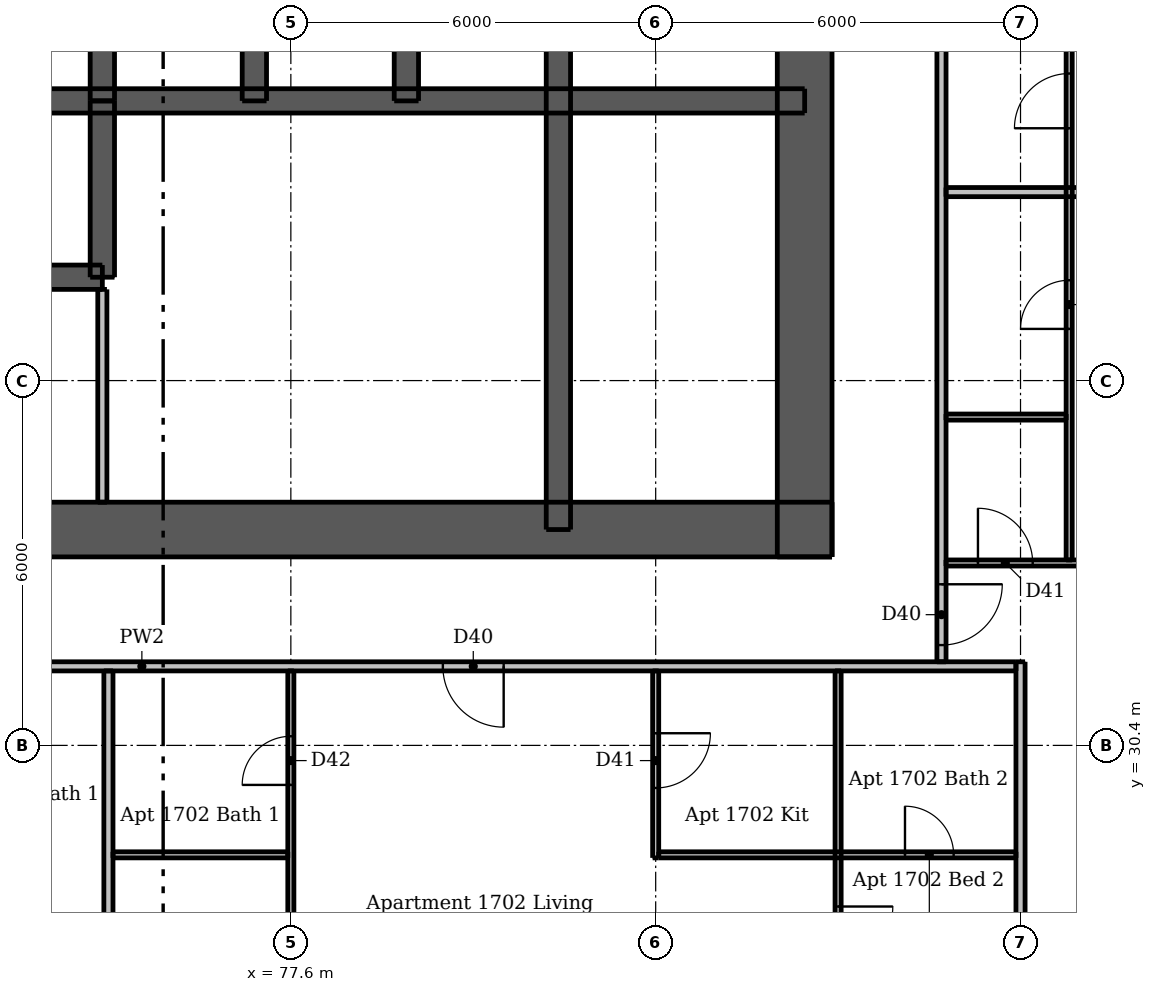
"""IFC4 building model, lengths in metres.
Left out: names, types, materials, properties, quantities, classifications, styles, units other than length and angle.
Written with IfcOpenShell. Run it as: python <this file> out.ifc"""

import sys

from ifc_helpers import new_model, si_unit, direction, frame, frame_2d, origin, place, context, subcontext, project, spatial, rectangle, extrude, element, fill, save


model = new_model("IFC4")
c1 = context("Model", 3, precision=1e-05, world=origin(), true_north=direction((0.0, 1.0)))
c2 = subcontext(c1, "Body", "Model", "MODEL_VIEW")
j1 = project(units=[si_unit("LENGTHUNIT", "METRE"), si_unit("PLANEANGLEUNIT", "RADIAN")], contexts=[c1])
p1 = place(None, origin())
s1 = spatial("IfcSite", under=j1, at=p1, CompositionType="ELEMENT")
p2 = place(p1, origin())
s2 = spatial("IfcBuilding", under=s1, at=p2, CompositionType="ELEMENT")
p3 = place(p2, frame((0.0, 0.0, 63.1)))
s3 = spatial("IfcBuildingStorey", under=s2, at=p3, CompositionType="ELEMENT", Elevation=63.1)
p4 = place(p3, frame((62.5, 33.95, 0.0), z_axis=(0.0, 0.0, 1.0), x_axis=(1.0, 0.0, 0.0)))
e1 = element("IfcWall", 1, at=p4, inside=s3, PredefinedType="SHEAR", context=c2, shape_type="SweptSolid", body=[
    extrude(rectangle(XDim=24.0, YDim=0.9, at=frame_2d((12.0, 0.0))), origin(), (0.0, 0.0, 1.0), 3.05),
])
p5 = place(p4, frame((2.05, 0.0, 0.0)))
e2 = element("IfcOpeningElement", 2, at=p5, cuts=e1, PredefinedType="OPENING", context=c2, shape_type="SweptSolid", body=[
    extrude(rectangle(XDim=1.1, YDim=2.1, at=frame_2d((0.55, 1.05))), frame((0.0, 0.46, 0.0), z_axis=(0.0, -1.0, 0.0), x_axis=(1.0, 0.0, 0.0)), (0.0, 0.0, 1.0), 0.92),
])
p6 = place(p4, frame((20.85, 0.0, 0.0)))
e3 = element("IfcOpeningElement", 3, at=p6, cuts=e1, PredefinedType="OPENING", context=c2, shape_type="SweptSolid", body=[
    extrude(rectangle(XDim=1.1, YDim=2.1, at=frame_2d((0.55, 1.05))), frame((0.0, 0.46, 0.0), z_axis=(0.0, -1.0, 0.0), x_axis=(1.0, 0.0, 0.0)), (0.0, 0.0, 1.0), 0.92),
])
p7 = place(p4, frame((8.0, 0.0, 0.0)))
e4 = element("IfcOpeningElement", 4, at=p7, cuts=e1, PredefinedType="OPENING", context=c2, shape_type="SweptSolid", body=[
    extrude(rectangle(XDim=1.1, YDim=2.1, at=frame_2d((0.55, 1.05))), frame((0.0, 0.46, 0.0), z_axis=(0.0, -1.0, 0.0), x_axis=(1.0, 0.0, 0.0)), (0.0, 0.0, 1.0), 0.92),
])
p8 = place(p4, frame((15.3, 0.0, 0.0)))
e5 = element("IfcOpeningElement", 5, at=p8, cuts=e1, PredefinedType="OPENING", context=c2, shape_type="SweptSolid", body=[
    extrude(rectangle(XDim=0.9, YDim=2.1, at=frame_2d((0.45, 1.05))), frame((0.0, 0.46, 0.0), z_axis=(0.0, -1.0, 0.0), x_axis=(1.0, 0.0, 0.0)), (0.0, 0.0, 1.0), 0.92),
])
p9 = place(p3, frame((86.05, 33.5, 0.0), z_axis=(0.0, 0.0, 1.0), x_axis=(0.0, 1.0, 0.0)))
e6 = element("IfcWall", 6, at=p9, inside=s3, PredefinedType="SHEAR", context=c2, shape_type="SweptSolid", body=[
    extrude(rectangle(XDim=24.0, YDim=0.9, at=frame_2d((12.0, 0.0))), origin(), (0.0, 0.0, 1.0), 3.05),
])
p10 = place(p9, frame((11.2, 0.0, 0.0)))
e7 = element("IfcOpeningElement", 7, at=p10, cuts=e6, PredefinedType="OPENING", context=c2, shape_type="SweptSolid", body=[
    extrude(rectangle(XDim=1.6, YDim=2.1, at=frame_2d((0.8, 1.05))), frame((0.0, 0.46, 0.0), z_axis=(0.0, -1.0, 0.0), x_axis=(1.0, 0.0, 0.0)), (0.0, 0.0, 1.0), 0.92),
])
p11 = place(p3, frame((62.95, 41.0, 0.0), z_axis=(0.0, 0.0, 1.0), x_axis=(1.0, 0.0, 0.0)))
e8 = element("IfcWall", 8, at=p11, inside=s3, PredefinedType="SHEAR", context=c2, shape_type="SweptSolid", body=[
    extrude(rectangle(XDim=23.1, YDim=0.4, at=frame_2d((11.55, 0.0))), origin(), (0.0, 0.0, 1.0), 3.05),
])
p12 = place(p3, frame((82.0, 33.95, 0.0), z_axis=(0.0, 0.0, 1.0), x_axis=(0.0, 1.0, 0.0)))
e9 = element("IfcWall", 9, at=p12, inside=s3, PredefinedType="SHEAR", context=c2, shape_type="SweptSolid", body=[
    extrude(rectangle(XDim=9.95, YDim=0.4, at=frame_2d((4.975, 0.0))), origin(), (0.0, 0.0, 1.0), 3.05),
])
for number, where, z_axis, x_axis in (
    (10, (74.5, 41.0, 0.0), (0.0, 0.0, 1.0), (0.0, 1.0, 0.0)),
    (11, (77.0, 41.0, 0.0), (0.0, 0.0, 1.0), (0.0, 1.0, 0.0)),
    (12, (79.5, 41.0, 0.0), (0.0, 0.0, 1.0), (0.0, 1.0, 0.0)),
):
    element("IfcWall", number, at=place(p3, frame(where, z_axis=z_axis, x_axis=x_axis)), inside=s3, PredefinedType="SHEAR", context=c2, shape_type="SweptSolid", body=[
        extrude(rectangle(XDim=2.9, YDim=0.4, at=frame_2d((1.45, 0.0))), origin(), (0.0, 0.0, 1.0), 3.05),
    ])
p13 = place(p3, frame((67.0, 38.1, 0.0), z_axis=(0.0, 0.0, 1.0), x_axis=(1.0, 0.0, 0.0)))
e13 = element("IfcWall", 13, at=p13, inside=s3, PredefinedType="SHEAR", context=c2, shape_type="SweptSolid", body=[
    extrude(rectangle(XDim=7.5, YDim=0.4, at=frame_2d((3.75, 0.0))), origin(), (0.0, 0.0, 1.0), 3.05),
])
p14 = place(p13, frame((0.7, 0.0, 0.0)))
e14 = element("IfcOpeningElement", 14, at=p14, cuts=e13, PredefinedType="OPENING", context=c2, shape_type="SweptSolid", body=[
    extrude(rectangle(XDim=1.1, YDim=2.1, at=frame_2d((0.55, 1.05))), frame((0.0, 0.21, 0.0), z_axis=(0.0, -1.0, 0.0), x_axis=(1.0, 0.0, 0.0)), (0.0, 0.0, 1.0), 0.42),
])
p15 = place(p13, frame((3.2, 0.0, 0.0)))
e15 = element("IfcOpeningElement", 15, at=p15, cuts=e13, PredefinedType="OPENING", context=c2, shape_type="SweptSolid", body=[
    extrude(rectangle(XDim=1.1, YDim=2.1, at=frame_2d((0.55, 1.05))), frame((0.0, 0.21, 0.0), z_axis=(0.0, -1.0, 0.0), x_axis=(1.0, 0.0, 0.0)), (0.0, 0.0, 1.0), 0.42),
])
p16 = place(p13, frame((5.65, 0.0, 0.0)))
e16 = element("IfcOpeningElement", 16, at=p16, cuts=e13, PredefinedType="OPENING", context=c2, shape_type="SweptSolid", body=[
    extrude(rectangle(XDim=1.2, YDim=2.1, at=frame_2d((0.6, 1.05))), frame((0.0, 0.21, 0.0), z_axis=(0.0, -1.0, 0.0), x_axis=(1.0, 0.0, 0.0)), (0.0, 0.0, 1.0), 0.42),
])
p17 = place(p3, frame((74.5, 38.1, 0.0), z_axis=(0.0, 0.0, 1.0), x_axis=(0.0, 1.0, 0.0)))
e17 = element("IfcWall", 17, at=p17, inside=s3, PredefinedType="SHEAR", context=c2, shape_type="SweptSolid", body=[
    extrude(rectangle(XDim=2.9, YDim=0.4, at=frame_2d((1.45, 0.0))), origin(), (0.0, 0.0, 1.0), 3.05),
])
p18 = place(p3, frame((74.5, 34.4, 0.0), z_axis=(0.0, 0.0, 1.0), x_axis=(0.0, 1.0, 0.0)))
e18 = element("IfcWall", 18, at=p18, inside=s3, PredefinedType="PLUMBINGWALL", context=c2, shape_type="SweptSolid", body=[
    extrude(rectangle(XDim=3.5, YDim=0.15, at=frame_2d((1.75, 0.0))), origin(), (0.0, 0.0, 1.0), 3.05),
])
p19 = place(p3, frame((77.6, 24.5, 0.0), z_axis=(0.0, 0.0, 1.0), x_axis=(0.0, 1.0, 0.0)))
e19 = element("IfcWall", 19, at=p19, inside=s3, PredefinedType="PARTITIONING", context=c2, shape_type="SweptSolid", body=[
    extrude(rectangle(XDim=7.125, YDim=0.1, at=frame_2d((3.562, 0.0))), origin(), (0.0, 0.0, 1.0), 2.59),
])
p20 = place(p19, frame((0.85, 0.0, 0.0)))
e20 = element("IfcOpeningElement", 20, at=p20, cuts=e19, PredefinedType="OPENING", context=c2, shape_type="SweptSolid", body=[
    extrude(rectangle(XDim=0.9, YDim=2.1, at=frame_2d((0.45, 1.05))), frame((0.0, 0.06, 0.0), z_axis=(0.0, -1.0, 0.0), x_axis=(1.0, 0.0, 0.0)), (0.0, 0.0, 1.0), 0.12),
])
p21 = place(p19, frame((5.25, 0.0, 0.0)))
e21 = element("IfcOpeningElement", 21, at=p21, cuts=e19, PredefinedType="OPENING", context=c2, shape_type="SweptSolid", body=[
    extrude(rectangle(XDim=0.8, YDim=2.1, at=frame_2d((0.4, 1.05))), frame((0.0, 0.06, 0.0), z_axis=(0.0, -1.0, 0.0), x_axis=(1.0, 0.0, 0.0)), (0.0, 0.0, 1.0), 0.12),
])
p22 = place(p3, frame((83.6, 31.625, 0.0), z_axis=(0.0, 0.0, 1.0), x_axis=(0.0, -1.0, 0.0)))
e22 = element("IfcWall", 22, at=p22, inside=s3, PredefinedType="PARTITIONING", context=c2, shape_type="SweptSolid", body=[
    extrude(rectangle(XDim=3.075, YDim=0.1, at=frame_2d((1.538, 0.0))), origin(), (0.0, 0.0, 1.0), 2.647),
])
p23 = place(p22, frame((1.025, 0.0, 0.0)))
e23 = element("IfcOpeningElement", 23, at=p23, cuts=e22, PredefinedType="OPENING", context=c2, shape_type="SweptSolid", body=[
    extrude(rectangle(XDim=0.9, YDim=2.1, at=frame_2d((0.45, 1.05))), frame((0.0, 0.06, 0.0), z_axis=(0.0, -1.0, 0.0), x_axis=(1.0, 0.0, 0.0)), (0.0, 0.0, 1.0), 0.12),
])
p24 = place(p3, frame((86.6, 31.625, 0.0), z_axis=(0.0, 0.0, 1.0), x_axis=(0.0, -1.0, 0.0)))
e24 = element("IfcWall", 24, at=p24, inside=s3, PredefinedType="PARTITIONING", context=c2, shape_type="SweptSolid", body=[
    extrude(rectangle(XDim=5.625, YDim=0.1, at=frame_2d((2.812, 0.0))), origin(), (0.0, 0.0, 1.0), 3.05),
])
p25 = place(p24, frame((3.875, 0.0, 0.0)))
e25 = element("IfcOpeningElement", 25, at=p25, cuts=e24, PredefinedType="OPENING", context=c2, shape_type="SweptSolid", body=[
    extrude(rectangle(XDim=0.9, YDim=2.1, at=frame_2d((0.45, 1.05))), frame((0.0, 0.06, 0.0), z_axis=(0.0, -1.0, 0.0), x_axis=(1.0, 0.0, 0.0)), (0.0, 0.0, 1.0), 0.12),
])
p26 = place(p3, frame((90.4, 33.45, 0.0), z_axis=(0.0, 0.0, 1.0), x_axis=(0.0, 1.0, 0.0)))
e26 = element("IfcWall", 26, at=p26, inside=s3, PredefinedType="PARTITIONING", context=c2, shape_type="SweptSolid", body=[
    extrude(rectangle(XDim=9.1, YDim=0.1, at=frame_2d((4.55, 0.0))), origin(), (0.0, 0.0, 1.0), 3.05),
])
p27 = place(p26, frame((3.8, 0.0, 0.0)))
e27 = element("IfcOpeningElement", 27, at=p27, cuts=e26, PredefinedType="OPENING", context=c2, shape_type="SweptSolid", body=[
    extrude(rectangle(XDim=0.8, YDim=2.1, at=frame_2d((0.4, 1.05))), frame((0.0, 0.06, 0.0), z_axis=(0.0, -1.0, 0.0), x_axis=(1.0, 0.0, 0.0)), (0.0, 0.0, 1.0), 0.12),
])
p28 = place(p26, frame((7.1, 0.0, 0.0)))
e28 = element("IfcOpeningElement", 28, at=p28, cuts=e26, PredefinedType="OPENING", context=c2, shape_type="SweptSolid", body=[
    extrude(rectangle(XDim=0.9, YDim=2.1, at=frame_2d((0.45, 1.05))), frame((0.0, 0.06, 0.0), z_axis=(0.0, -1.0, 0.0), x_axis=(1.0, 0.0, 0.0)), (0.0, 0.0, 1.0), 0.12),
])
p29 = place(p3, frame((88.375, 35.8, 0.0), z_axis=(0.0, 0.0, 1.0), x_axis=(1.0, 0.0, 0.0)))
e29 = element("IfcWall", 29, at=p29, inside=s3, PredefinedType="PARTITIONING", context=c2, shape_type="SweptSolid", body=[
    extrude(rectangle(XDim=1.975, YDim=0.1, at=frame_2d((0.988, 0.0))), origin(), (0.0, 0.0, 1.0), 3.05),
])
p30 = place(p3, frame((88.375, 33.4, 0.0), z_axis=(0.0, 0.0, 1.0), x_axis=(1.0, 0.0, 0.0)))
e30 = element("IfcWall", 30, at=p30, inside=s3, PredefinedType="PARTITIONING", context=c2, shape_type="SweptSolid", body=[
    extrude(rectangle(XDim=5.625, YDim=0.1, at=frame_2d((2.812, 0.0))), origin(), (0.0, 0.0, 1.0), 3.05),
])
p31 = place(p30, frame((0.525, 0.0, 0.0)))
e31 = element("IfcOpeningElement", 31, at=p31, cuts=e30, PredefinedType="OPENING", context=c2, shape_type="SweptSolid", body=[
    extrude(rectangle(XDim=0.9, YDim=2.1, at=frame_2d((0.45, 1.05))), frame((0.0, 0.06, 0.0), z_axis=(0.0, -1.0, 0.0), x_axis=(1.0, 0.0, 0.0)), (0.0, 0.0, 1.0), 0.12),
])
p32 = place(p30, frame((3.375, 0.0, 0.0)))
e32 = element("IfcOpeningElement", 32, at=p32, cuts=e30, PredefinedType="OPENING", context=c2, shape_type="SweptSolid", body=[
    extrude(rectangle(XDim=0.9, YDim=2.1, at=frame_2d((0.45, 1.05))), frame((0.0, 0.06, 0.0), z_axis=(0.0, -1.0, 0.0), x_axis=(1.0, 0.0, 0.0)), (0.0, 0.0, 1.0), 0.12),
])
p33 = place(p3, frame((74.675, 28.6, 0.0), z_axis=(0.0, 0.0, 1.0), x_axis=(1.0, 0.0, 0.0)))
e33 = element("IfcWall", 33, at=p33, inside=s3, PredefinedType="PARTITIONING", context=c2, shape_type="SweptSolid", body=[
    extrude(rectangle(XDim=2.875, YDim=0.1, at=frame_2d((1.438, 0.0))), origin(), (0.0, 0.0, 1.0), 3.05),
])
p34 = place(p3, frame((83.65, 28.6, 0.0), z_axis=(0.0, 0.0, 1.0), x_axis=(1.0, 0.0, 0.0)))
e34 = element("IfcWall", 34, at=p34, inside=s3, PredefinedType="PARTITIONING", context=c2, shape_type="SweptSolid", body=[
    extrude(rectangle(XDim=5.875, YDim=0.1, at=frame_2d((2.938, 0.0))), origin(), (0.0, 0.0, 1.0), 3.05),
])
p35 = place(p34, frame((4.05, 0.0, 0.0)))
e35 = element("IfcOpeningElement", 35, at=p35, cuts=e34, PredefinedType="OPENING", context=c2, shape_type="SweptSolid", body=[
    extrude(rectangle(XDim=0.8, YDim=2.1, at=frame_2d((0.4, 1.05))), frame((0.0, 0.06, 0.0), z_axis=(0.0, -1.0, 0.0), x_axis=(1.0, 0.0, 0.0)), (0.0, 0.0, 1.0), 0.12),
])
p36 = place(p3, frame((74.6, 21.5, 0.0), z_axis=(0.0, 0.0, 1.0), x_axis=(0.0, 1.0, 0.0)))
e36 = element("IfcWall", 36, at=p36, inside=s3, PredefinedType="PARTITIONING", context=c2, shape_type="SweptSolid", body=[
    extrude(rectangle(XDim=10.125, YDim=0.15, at=frame_2d((5.062, 0.0))), origin(), (0.0, 0.0, 1.0), 3.05),
])
p37 = place(p3, frame((88.3, 60.475, 0.0), z_axis=(0.0, 0.0, 1.0), x_axis=(0.0, -1.0, 0.0)))
e37 = element("IfcWall", 37, at=p37, inside=s3, PredefinedType="PARTITIONING", context=c2, shape_type="SweptSolid", body=[
    extrude(rectangle(XDim=28.7, YDim=0.15, at=frame_2d((14.35, 0.0))), origin(), (0.0, 0.0, 1.0), 3.05),
])
p38 = place(p37, frame((27.425, 0.0, 0.0)))
e38 = element("IfcOpeningElement", 38, at=p38, cuts=e37, PredefinedType="OPENING", context=c2, shape_type="SweptSolid", body=[
    extrude(rectangle(XDim=1.0, YDim=2.1, at=frame_2d((0.5, 1.05))), frame((0.0, 0.085, 0.0), z_axis=(0.0, -1.0, 0.0), x_axis=(1.0, 0.0, 0.0)), (0.0, 0.0, 1.0), 0.17),
])
p39 = place(p37, frame((14.525, 0.0, 0.0)))
e39 = element("IfcOpeningElement", 39, at=p39, cuts=e37, PredefinedType="OPENING", context=c2, shape_type="SweptSolid", body=[
    extrude(rectangle(XDim=1.0, YDim=2.1, at=frame_2d((0.5, 1.05))), frame((0.0, 0.085, 0.0), z_axis=(0.0, -1.0, 0.0), x_axis=(1.0, 0.0, 0.0)), (0.0, 0.0, 1.0), 0.17),
])
p40 = place(p37, frame((3.775, 0.0, 0.0)))
e40 = element("IfcOpeningElement", 40, at=p40, cuts=e37, PredefinedType="OPENING", context=c2, shape_type="SweptSolid", body=[
    extrude(rectangle(XDim=1.0, YDim=2.1, at=frame_2d((0.5, 1.05))), frame((0.0, 0.085, 0.0), z_axis=(0.0, -1.0, 0.0), x_axis=(1.0, 0.0, 0.0)), (0.0, 0.0, 1.0), 0.17),
])
p41 = place(p3, frame((89.6, 26.0, 0.0), z_axis=(0.0, 0.0, 1.0), x_axis=(0.0, 1.0, 0.0)))
e41 = element("IfcWall", 41, at=p41, inside=s3, PredefinedType="PARTITIONING", context=c2, shape_type="SweptSolid", body=[
    extrude(rectangle(XDim=5.775, YDim=0.15, at=frame_2d((2.887, 0.0))), origin(), (0.0, 0.0, 1.0), 2.516),
])
p42 = place(p3, frame((88.375, 39.5, 0.0), z_axis=(0.0, 0.0, 1.0), x_axis=(1.0, 0.0, 0.0)))
e42 = element("IfcWall", 42, at=p42, inside=s3, PredefinedType="PARTITIONING", context=c2, shape_type="SweptSolid", body=[
    extrude(rectangle(XDim=5.625, YDim=0.15, at=frame_2d((2.812, 0.0))), origin(), (0.0, 0.0, 1.0), 3.05),
])
p43 = place(p3, frame((89.525, 31.7, 0.0), z_axis=(0.0, 0.0, 1.0), x_axis=(-1.0, 0.0, 0.0)))
e43 = element("IfcWall", 43, at=p43, inside=s3, PredefinedType="PARTITIONING", context=c2, shape_type="SweptSolid", body=[
    extrude(rectangle(XDim=28.75, YDim=0.15, at=frame_2d((14.375, 0.0))), origin(), (0.0, 0.0, 1.0), 3.05),
])
p44 = place(p43, frame((24.625, 0.0, 0.0)))
e44 = element("IfcOpeningElement", 44, at=p44, cuts=e43, PredefinedType="OPENING", context=c2, shape_type="SweptSolid", body=[
    extrude(rectangle(XDim=1.0, YDim=2.1, at=frame_2d((0.5, 1.05))), frame((0.0, 0.085, 0.0), z_axis=(0.0, -1.0, 0.0), x_axis=(1.0, 0.0, 0.0)), (0.0, 0.0, 1.0), 0.17),
])
p45 = place(p43, frame((8.425, 0.0, 0.0)))
e45 = element("IfcOpeningElement", 45, at=p45, cuts=e43, PredefinedType="OPENING", context=c2, shape_type="SweptSolid", body=[
    extrude(rectangle(XDim=1.0, YDim=2.1, at=frame_2d((0.5, 1.05))), frame((0.0, 0.085, 0.0), z_axis=(0.0, -1.0, 0.0), x_axis=(1.0, 0.0, 0.0)), (0.0, 0.0, 1.0), 0.17),
])
p46 = place(p6, origin())
e46 = element("IfcDoor", 46, at=p46, inside=s3, OperationType="SINGLE_SWING_RIGHT", PredefinedType="DOOR", context=c2, shape_type="SweptSolid", body=[
    extrude(rectangle(XDim=1.1, YDim=2.1, at=frame_2d((0.55, 1.05))), frame((0.0, 0.438, 0.0), z_axis=(0.0, -1.0, 0.0), x_axis=(1.0, 0.0, 0.0)), (0.0, 0.0, 1.0), 0.05),
])
fill(e3, e46)
p47 = place(p8, origin())
e47 = element("IfcDoor", 47, at=p47, inside=s3, OperationType="SINGLE_SWING_LEFT", PredefinedType="DOOR", context=c2, shape_type="SweptSolid", body=[
    extrude(rectangle(XDim=0.9, YDim=2.1, at=frame_2d((0.45, 1.05))), frame((0.0, 0.438, 0.0), z_axis=(0.0, -1.0, 0.0), x_axis=(1.0, 0.0, 0.0)), (0.0, 0.0, 1.0), 0.05),
])
fill(e5, e47)
p48 = place(p16, origin())
e48 = element("IfcDoor", 48, at=p48, inside=s3, OperationType="DOUBLE_DOOR_SLIDING", PredefinedType="DOOR", context=c2, shape_type="SweptSolid", body=[
    extrude(rectangle(XDim=1.2, YDim=2.1, at=frame_2d((0.6, 1.05))), frame((0.0, 0.025, 0.0), z_axis=(0.0, -1.0, 0.0), x_axis=(1.0, 0.0, 0.0)), (0.0, 0.0, 1.0), 0.05),
])
fill(e16, e48)
p49 = place(p45, origin())
e49 = element("IfcDoor", 49, at=p49, inside=s3, OperationType="SINGLE_SWING_LEFT", PredefinedType="DOOR", context=c2, shape_type="SweptSolid", body=[
    extrude(rectangle(XDim=1.0, YDim=2.1, at=frame_2d((0.5, 1.05))), frame((0.0, 0.025, 0.0), z_axis=(0.0, -1.0, 0.0), x_axis=(1.0, 0.0, 0.0)), (0.0, 0.0, 1.0), 0.05),
])
fill(e45, e49)
p50 = place(p23, origin())
e50 = element("IfcDoor", 50, at=p50, inside=s3, OperationType="SINGLE_SWING_LEFT", PredefinedType="DOOR", context=c2, shape_type="SweptSolid", body=[
    extrude(rectangle(XDim=0.9, YDim=2.1, at=frame_2d((0.45, 1.05))), frame((0.0, 0.025, 0.0), z_axis=(0.0, -1.0, 0.0), x_axis=(1.0, 0.0, 0.0)), (0.0, 0.0, 1.0), 0.05),
])
fill(e23, e50)
p51 = place(p21, origin())
e51 = element("IfcDoor", 51, at=p51, inside=s3, OperationType="SINGLE_SWING_LEFT", PredefinedType="DOOR", context=c2, shape_type="SweptSolid", body=[
    extrude(rectangle(XDim=0.8, YDim=2.1, at=frame_2d((0.4, 1.05))), frame((0.0, 0.025, 0.0), z_axis=(0.0, -1.0, 0.0), x_axis=(1.0, 0.0, 0.0)), (0.0, 0.0, 1.0), 0.05),
])
fill(e21, e51)
p52 = place(p25, origin())
e52 = element("IfcDoor", 52, at=p52, inside=s3, OperationType="SINGLE_SWING_LEFT", PredefinedType="DOOR", context=c2, shape_type="SweptSolid", body=[
    extrude(rectangle(XDim=0.9, YDim=2.1, at=frame_2d((0.45, 1.05))), frame((0.0, 0.025, 0.0), z_axis=(0.0, -1.0, 0.0), x_axis=(1.0, 0.0, 0.0)), (0.0, 0.0, 1.0), 0.05),
])
fill(e25, e52)
p53 = place(p35, origin())
e53 = element("IfcDoor", 53, at=p53, inside=s3, OperationType="SINGLE_SWING_LEFT", PredefinedType="DOOR", context=c2, shape_type="SweptSolid", body=[
    extrude(rectangle(XDim=0.8, YDim=2.1, at=frame_2d((0.4, 1.05))), frame((0.0, 0.025, 0.0), z_axis=(0.0, -1.0, 0.0), x_axis=(1.0, 0.0, 0.0)), (0.0, 0.0, 1.0), 0.05),
])
fill(e35, e53)
p54 = place(p38, origin())
e54 = element("IfcDoor", 54, at=p54, inside=s3, OperationType="SINGLE_SWING_LEFT", PredefinedType="DOOR", context=c2, shape_type="SweptSolid", body=[
    extrude(rectangle(XDim=1.0, YDim=2.1, at=frame_2d((0.5, 1.05))), frame((0.0, 0.025, 0.0), z_axis=(0.0, -1.0, 0.0), x_axis=(1.0, 0.0, 0.0)), (0.0, 0.0, 1.0), 0.05),
])
fill(e38, e54)
p55 = place(p31, origin())
e55 = element("IfcDoor", 55, at=p55, inside=s3, OperationType="SINGLE_SWING_LEFT", PredefinedType="DOOR", context=c2, shape_type="SweptSolid", body=[
    extrude(rectangle(XDim=0.9, YDim=2.1, at=frame_2d((0.45, 1.05))), frame((0.0, 0.025, 0.0), z_axis=(0.0, -1.0, 0.0), x_axis=(1.0, 0.0, 0.0)), (0.0, 0.0, 1.0), 0.05),
])
fill(e31, e55)
p56 = place(p27, origin())
e56 = element("IfcDoor", 56, at=p56, inside=s3, OperationType="SINGLE_SWING_LEFT", PredefinedType="DOOR", context=c2, shape_type="SweptSolid", body=[
    extrude(rectangle(XDim=0.8, YDim=2.1, at=frame_2d((0.4, 1.05))), frame((0.0, 0.025, 0.0), z_axis=(0.0, -1.0, 0.0), x_axis=(1.0, 0.0, 0.0)), (0.0, 0.0, 1.0), 0.05),
])
fill(e27, e56)
p57 = place(p28, origin())
e57 = element("IfcDoor", 57, at=p57, inside=s3, OperationType="SINGLE_SWING_LEFT", PredefinedType="DOOR", context=c2, shape_type="SweptSolid", body=[
    extrude(rectangle(XDim=0.9, YDim=2.1, at=frame_2d((0.45, 1.05))), frame((0.0, 0.025, 0.0), z_axis=(0.0, -1.0, 0.0), x_axis=(1.0, 0.0, 0.0)), (0.0, 0.0, 1.0), 0.05),
])
fill(e28, e57)
save(model, sys.argv[1])
